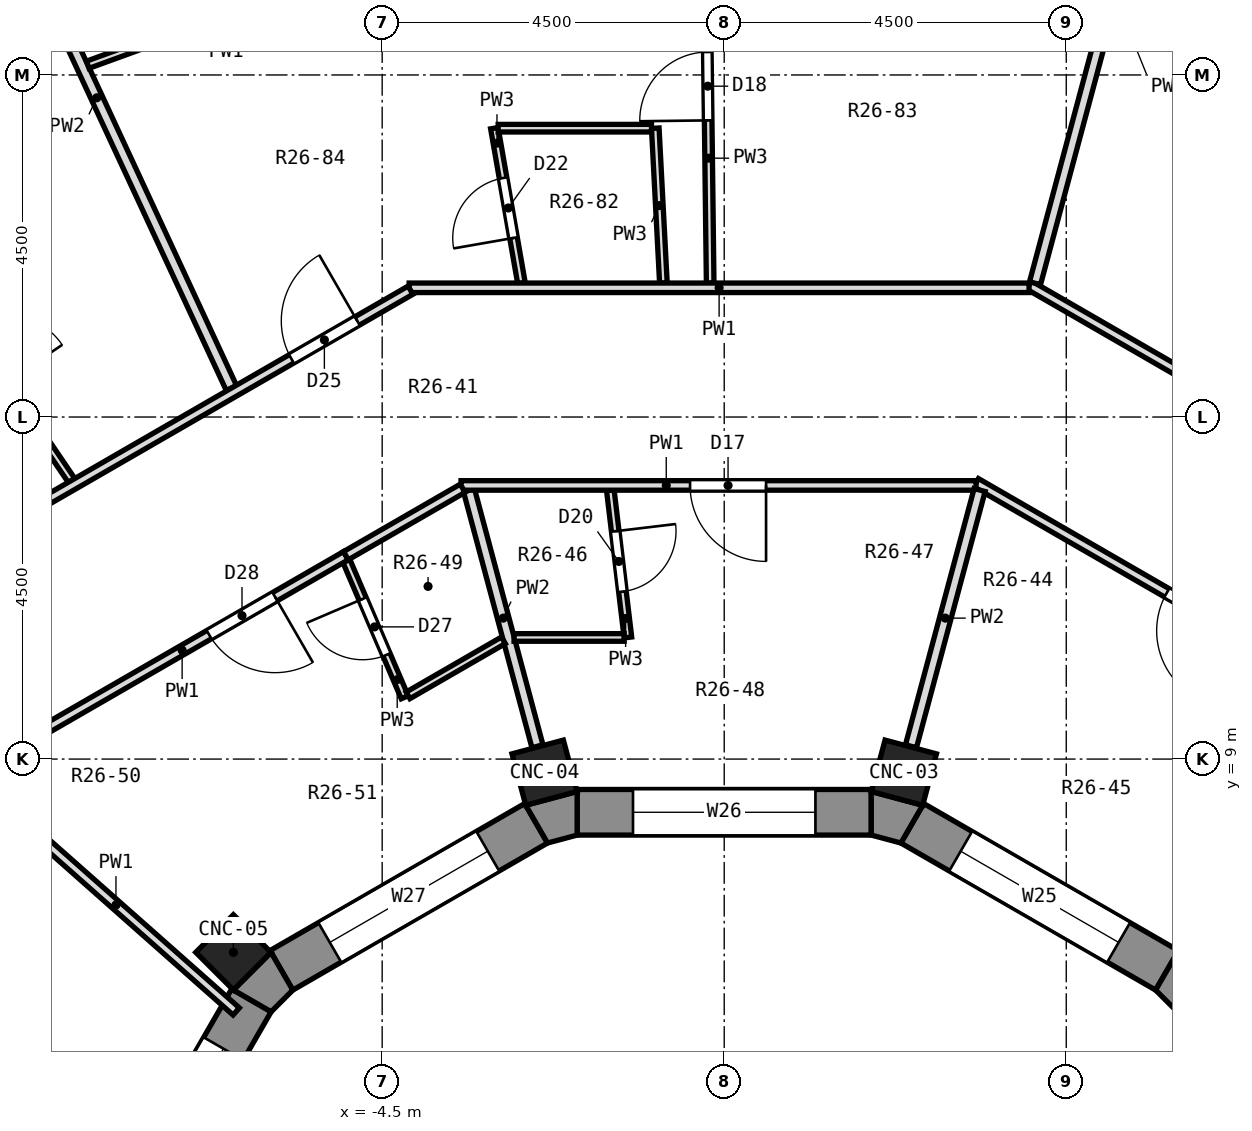
"""IFC4 building model, lengths in metres.
Left out: names, types, materials, properties, quantities, classifications, styles, units other than length and angle.
Written with IfcOpenShell. Run it as: python <this file> out.ifc"""

import sys

from ifc_helpers import new_model, si_unit, direction, frame, frame_2d, origin, origin_2d, place, context, subcontext, project, spatial, polyline, rectangle, outline, extrude, element, fill, save


model = new_model("IFC4")
c1 = context("Model", 3, precision=1e-05, world=origin(), true_north=direction((0.0, 1.0)))
c2 = subcontext(c1, "Body", "Model", "MODEL_VIEW")
j1 = project(units=[si_unit("LENGTHUNIT", "METRE"), si_unit("PLANEANGLEUNIT", "RADIAN")], contexts=[c1])
p1 = place(None, origin())
s1 = spatial("IfcSite", under=j1, at=p1, CompositionType="ELEMENT")
p2 = place(p1, origin())
s2 = spatial("IfcBuilding", under=s1, at=p2, CompositionType="ELEMENT")
p3 = place(p2, frame((0.0, 0.0, 170.7)))
s3 = spatial("IfcBuildingStorey", under=s2, at=p3, CompositionType="ELEMENT", Elevation=170.7)
for number, where, z_axis, x_axis in (
    (1, (2.364, 8.821, 0.0), (0.0, 0.0, 1.0), (0.259, 0.966, 0.0)),
    (2, (-2.364, 8.821, 0.0), (0.0, 0.0, 1.0), (-0.259, 0.966, 0.0)),
    (3, (-6.458, 6.458, 0.0), (0.0, 0.0, 1.0), (-0.707, 0.707, 0.0)),
):
    element("IfcColumn", number, at=place(p3, frame(where, z_axis=z_axis, x_axis=x_axis)), inside=s3, PredefinedType="COLUMN", context=c2, shape_type="SweptSolid", body=[
        extrude(rectangle(XDim=0.7, YDim=0.7, at=origin_2d()), origin(), (0.0, 0.0, 1.0), 3.3),
    ])
p4 = place(p3, frame((5.826, 6.22, 0.0), z_axis=(0.0, 0.0, 1.0), x_axis=(-0.866005929495, 0.500033728941, 0.0)))
e4 = element("IfcWall", 4, at=p4, inside=s3, PredefinedType="SOLIDWALL", context=c2, shape_type="SweptSolid", body=[
    extrude(rectangle(XDim=3.87, YDim=0.6, at=frame_2d((1.935, 0.0))), origin(), (0.0, 0.0, 1.0), 2.85),
])
p5 = place(p4, frame((0.735, 0.0, 0.9)))
e5 = element("IfcOpeningElement", 5, at=p5, cuts=e4, PredefinedType="OPENING", context=c2, shape_type="SweptSolid", body=[
    extrude(rectangle(XDim=2.4, YDim=1.8, at=frame_2d((1.2, 0.9))), frame((0.0, 0.312, 0.0), z_axis=(0.0, -1.0, 0.0), x_axis=(1.0, 0.0, 0.0)), (0.0, 0.0, 1.0), 0.624),
])
p6 = place(p3, frame((1.935, 8.3, 0.0), z_axis=(0.0, 0.0, 1.0), x_axis=(-1.0, 0.0, 0.0)))
e6 = element("IfcWall", 6, at=p6, inside=s3, PredefinedType="SOLIDWALL", context=c2, shape_type="SweptSolid", body=[
    extrude(rectangle(XDim=3.87, YDim=0.6, at=frame_2d((1.935, 0.0))), origin(), (0.0, 0.0, 1.0), 2.85),
])
p7 = place(p6, frame((0.735, 0.0, 0.9)))
e7 = element("IfcOpeningElement", 7, at=p7, cuts=e6, PredefinedType="OPENING", context=c2, shape_type="SweptSolid", body=[
    extrude(rectangle(XDim=2.4, YDim=1.8, at=frame_2d((1.2, 0.9))), frame((0.0, 0.312, 0.0), z_axis=(0.0, -1.0, 0.0), x_axis=(1.0, 0.0, 0.0)), (0.0, 0.0, 1.0), 0.624),
])
p8 = place(p3, frame((-2.474, 8.156, 0.0), z_axis=(0.0, 0.0, 1.0), x_axis=(-0.866005929495, -0.500033728941, 0.0)))
e8 = element("IfcWall", 8, at=p8, inside=s3, PredefinedType="SOLIDWALL", context=c2, shape_type="SweptSolid", body=[
    extrude(rectangle(XDim=3.87, YDim=0.6, at=frame_2d((1.935, 0.0))), origin(), (0.0, 0.0, 1.0), 2.85),
])
p9 = place(p8, frame((0.735, 0.0, 0.9)))
e9 = element("IfcOpeningElement", 9, at=p9, cuts=e8, PredefinedType="OPENING", context=c2, shape_type="SweptSolid", body=[
    extrude(rectangle(XDim=2.4, YDim=1.8, at=frame_2d((1.2, 0.9))), frame((0.0, 0.312, 0.0), z_axis=(0.0, -1.0, 0.0), x_axis=(1.0, 0.0, 0.0)), (0.0, 0.0, 1.0), 0.624),
])
p10 = place(p3, frame((-6.22, 5.826, 0.0), z_axis=(0.0, 0.0, 1.0), x_axis=(-0.500033728941, -0.866005929495, 0.0)))
e10 = element("IfcWall", 10, at=p10, inside=s3, PredefinedType="SOLIDWALL", context=c2, shape_type="SweptSolid", body=[
    extrude(rectangle(XDim=3.87, YDim=0.6, at=frame_2d((1.935, 0.0))), origin(), (0.0, 0.0, 1.0), 2.85),
])
p11 = place(p10, frame((0.735, 0.0, 0.9)))
e11 = element("IfcOpeningElement", 11, at=p11, cuts=e10, PredefinedType="OPENING", context=c2, shape_type="SweptSolid", body=[
    extrude(rectangle(XDim=2.4, YDim=1.8, at=frame_2d((1.2, 0.9))), frame((0.0, 0.312, 0.0), z_axis=(0.0, -1.0, 0.0), x_axis=(1.0, 0.0, 0.0)), (0.0, 0.0, 1.0), 0.624),
])
p12 = place(p3, origin())
e12 = element("IfcWall", 12, at=p12, inside=s3, PredefinedType="SOLIDWALL", context=c2, shape_type="SweptSolid", body=[
    extrude(outline(polyline([(5.962, 6.458), (5.676, 5.961), (5.961, 5.676), (6.458, 5.962), (5.962, 6.458)])), origin(), (0.0, 0.0, 1.0), 2.85),
])
p13 = place(p3, origin())
e13 = element("IfcWall", 13, at=p13, inside=s3, PredefinedType="SOLIDWALL", context=c2, shape_type="SweptSolid", body=[
    extrude(outline(polyline([(1.935, 8.573), (1.935, 8.0), (2.324, 7.896), (2.611, 8.392), (1.935, 8.573)])), origin(), (0.0, 0.0, 1.0), 2.85),
])
p14 = place(p3, origin())
e14 = element("IfcWall", 14, at=p14, inside=s3, PredefinedType="SOLIDWALL", context=c2, shape_type="SweptSolid", body=[
    extrude(outline(polyline([(-1.935, 8.0), (-1.935, 8.573), (-2.611, 8.392), (-2.324, 7.896), (-1.935, 8.0)])), origin(), (0.0, 0.0, 1.0), 2.85),
])
p15 = place(p3, origin())
e15 = element("IfcWall", 15, at=p15, inside=s3, PredefinedType="SOLIDWALL", context=c2, shape_type="SweptSolid", body=[
    extrude(outline(polyline([(-6.458, 5.962), (-5.961, 5.676), (-5.676, 5.961), (-5.962, 6.458), (-6.458, 5.962)])), origin(), (0.0, 0.0, 1.0), 2.85),
])
p16 = place(p3, frame((-0.241, 19.855, 0.0), z_axis=(0.0, 0.0, 1.0), x_axis=(0.012332271409, -0.999923954649, 0.0)))
e16 = element("IfcWall", 16, at=p16, inside=s3, PredefinedType="PARTITIONING", context=c2, shape_type="SweptSolid", body=[
    extrude(rectangle(XDim=4.593, YDim=0.1, at=frame_2d((2.296, 0.0))), origin(), (0.0, 0.0, 1.0), 2.85),
])
p17 = place(p16, frame((1.553, 0.0, 0.0)))
e17 = element("IfcOpeningElement", 17, at=p17, cuts=e16, PredefinedType="OPENING", context=c2, shape_type="SweptSolid", body=[
    extrude(rectangle(XDim=0.9, YDim=2.1, at=frame_2d((0.45, 1.05))), frame((0.0, 0.062, 0.0), z_axis=(0.0, -1.0, 0.0), x_axis=(1.0, 0.0, 0.0)), (0.0, 0.0, 1.0), 0.124),
])
p18 = place(p3, frame((-0.907, 17.3, 0.0), z_axis=(0.0, 0.0, 1.0), x_axis=(0.052288783436, -0.998632005859, 0.0)))
e18 = element("IfcWall", 18, at=p18, inside=s3, PredefinedType="PARTITIONING", context=c2, shape_type="SweptSolid", body=[
    extrude(rectangle(XDim=2.04, YDim=0.1, at=frame_2d((1.02, 0.0))), origin(), (0.0, 0.0, 1.0), 2.85),
])
p19 = place(p3, frame((-1.499, 12.538, 0.0), z_axis=(0.0, 0.0, 1.0), x_axis=(0.118597630283, -0.99294239616, 0.0)))
e19 = element("IfcWall", 19, at=p19, inside=s3, PredefinedType="PARTITIONING", context=c2, shape_type="SweptSolid", body=[
    extrude(rectangle(XDim=1.951, YDim=0.1, at=frame_2d((0.976, 0.0))), origin(), (0.0, 0.0, 1.0), 2.85),
])
p20 = place(p19, frame((0.545, 0.0, 0.0)))
e20 = element("IfcOpeningElement", 20, at=p20, cuts=e19, PredefinedType="OPENING", context=c2, shape_type="SweptSolid", body=[
    extrude(rectangle(XDim=0.8, YDim=2.1, at=frame_2d((0.4, 1.05))), frame((0.0, 0.062, 0.0), z_axis=(0.0, -1.0, 0.0), x_axis=(1.0, 0.0, 0.0)), (0.0, 0.0, 1.0), 0.124),
])
p21 = place(p3, frame((-3.024, 17.3, 0.0), z_axis=(0.0, 0.0, 1.0), x_axis=(0.172122773882, -0.985075505081, 0.0)))
e21 = element("IfcWall", 21, at=p21, inside=s3, PredefinedType="PARTITIONING", context=c2, shape_type="SweptSolid", body=[
    extrude(rectangle(XDim=2.07, YDim=0.1, at=frame_2d((1.035, 0.0))), origin(), (0.0, 0.0, 1.0), 2.85),
])
p22 = place(p21, frame((0.666, 0.0, 0.0)))
e22 = element("IfcOpeningElement", 22, at=p22, cuts=e21, PredefinedType="OPENING", context=c2, shape_type="SweptSolid", body=[
    extrude(rectangle(XDim=0.8, YDim=2.1, at=frame_2d((0.4, 1.05))), frame((0.0, 0.062, 0.0), z_axis=(0.0, -1.0, 0.0), x_axis=(1.0, 0.0, 0.0)), (0.0, 0.0, 1.0), 0.124),
])
p23 = place(p3, frame((-3.359, 12.54, 0.0), z_axis=(0.0, 0.0, 1.0), x_axis=(0.258289617132, -0.966067530601, 0.0)))
e23 = element("IfcWall", 23, at=p23, inside=s3, PredefinedType="PARTITIONING", context=c2, shape_type="SweptSolid", body=[
    extrude(rectangle(XDim=3.49, YDim=0.15, at=frame_2d((1.745, 0.0))), origin(), (0.0, 0.0, 1.0), 2.85),
])
p24 = place(p3, frame((-4.971, 11.607, 0.0), z_axis=(0.0, 0.0, 1.0), x_axis=(0.393707969646, -0.919235570807, 0.0)))
e24 = element("IfcWall", 24, at=p24, inside=s3, PredefinedType="PARTITIONING", context=c2, shape_type="SweptSolid", body=[
    extrude(rectangle(XDim=1.952, YDim=0.1, at=frame_2d((0.976, 0.0))), origin(), (0.0, 0.0, 1.0), 2.85),
])
p25 = place(p24, frame((0.545, 0.0, 0.0)))
e25 = element("IfcOpeningElement", 25, at=p25, cuts=e24, PredefinedType="OPENING", context=c2, shape_type="SweptSolid", body=[
    extrude(rectangle(XDim=0.8, YDim=2.1, at=frame_2d((0.4, 1.05))), frame((0.0, 0.062, 0.0), z_axis=(0.0, -1.0, 0.0), x_axis=(1.0, 0.0, 0.0)), (0.0, 0.0, 1.0), 0.124),
])
p26 = place(p3, frame((-10.026, 21.519, 0.0), z_axis=(0.0, 0.0, 1.0), x_axis=(0.420738120606, -0.907182139302, 0.0)))
e26 = element("IfcWall", 26, at=p26, inside=s3, PredefinedType="PARTITIONING", context=c2, shape_type="SweptSolid", body=[
    extrude(rectangle(XDim=8.42, YDim=0.15, at=frame_2d((4.21, 0.0))), origin(), (0.0, 0.0, 1.0), 2.85),
])
p27 = place(p3, frame((-10.862, 16.02, 0.0), z_axis=(0.0, 0.0, 1.0), x_axis=(0.5612995905, -0.827612693054, 0.0)))
e27 = element("IfcWall", 27, at=p27, inside=s3, PredefinedType="PARTITIONING", context=c2, shape_type="SweptSolid", body=[
    extrude(rectangle(XDim=4.053, YDim=0.1, at=frame_2d((2.026, 0.0))), origin(), (0.0, 0.0, 1.0), 2.85),
])
p28 = place(p27, frame((1.608, 0.0, 0.0)))
e28 = element("IfcOpeningElement", 28, at=p28, cuts=e27, PredefinedType="OPENING", context=c2, shape_type="SweptSolid", body=[
    extrude(rectangle(XDim=0.9, YDim=2.1, at=frame_2d((0.45, 1.05))), frame((0.0, 0.062, 0.0), z_axis=(0.0, -1.0, 0.0), x_axis=(1.0, 0.0, 0.0)), (0.0, 0.0, 1.0), 0.124),
])
p29 = place(p3, frame((-9.585, 8.48, 0.0), z_axis=(0.0, 0.0, 1.0), x_axis=(0.748972302021, -0.662601306069, 0.0)))
e29 = element("IfcWall", 29, at=p29, inside=s3, PredefinedType="PARTITIONING", context=c2, shape_type="SweptSolid", body=[
    extrude(rectangle(XDim=4.226, YDim=0.125, at=frame_2d((2.113, 0.0))), origin(), (0.0, 0.0, 1.0), 2.85),
])
p30 = place(p3, frame((3.313, 12.636, 0.0), z_axis=(0.0, 0.0, 1.0), x_axis=(0.866048512801, -0.499959971872, 0.0)))
e30 = element("IfcWall", 30, at=p30, inside=s3, PredefinedType="PARTITIONING", context=c2, shape_type="SweptSolid", body=[
    extrude(rectangle(XDim=6.762, YDim=0.125, at=frame_2d((3.381, 0.0))), origin(), (0.0, 0.0, 1.0), 2.85),
])
p31 = place(p30, frame((2.898, 0.0, 0.0)))
e31 = element("IfcOpeningElement", 31, at=p31, cuts=e30, PredefinedType="OPENING", context=c2, shape_type="SweptSolid", body=[
    extrude(rectangle(XDim=1.0, YDim=2.1, at=frame_2d((0.5, 1.05))), frame((0.0, 0.074, 0.0), z_axis=(0.0, -1.0, 0.0), x_axis=(1.0, 0.0, 0.0)), (0.0, 0.0, 1.0), 0.149),
])
p32 = place(p3, frame((4.01, 15.236, 0.0), z_axis=(0.0, 0.0, 1.0), x_axis=(0.865999621737, -0.500044653157, 0.0)))
e32 = element("IfcWall", 32, at=p32, inside=s3, PredefinedType="PARTITIONING", context=c2, shape_type="SweptSolid", body=[
    extrude(rectangle(XDim=8.155, YDim=0.125, at=frame_2d((4.078, 0.0))), origin(), (0.0, 0.0, 1.0), 2.85),
])
p33 = place(p32, frame((2.656, 0.0, 0.0)))
e33 = element("IfcOpeningElement", 33, at=p33, cuts=e32, PredefinedType="OPENING", context=c2, shape_type="SweptSolid", body=[
    extrude(rectangle(XDim=1.0, YDim=2.1, at=frame_2d((0.5, 1.05))), frame((0.0, 0.074, 0.0), z_axis=(0.0, -1.0, 0.0), x_axis=(1.0, 0.0, 0.0)), (0.0, 0.0, 1.0), 0.149),
])
p34 = place(p3, frame((-2.765, 10.6, 0.0), z_axis=(0.0, 0.0, 1.0), x_axis=(1.0, 0.0, 0.0)))
e34 = element("IfcWall", 34, at=p34, inside=s3, PredefinedType="PARTITIONING", context=c2, shape_type="SweptSolid", body=[
    extrude(rectangle(XDim=1.448, YDim=0.1, at=frame_2d((0.724, 0.0))), origin(), (0.0, 0.0, 1.0), 2.85),
])
p35 = place(p3, frame((-3.463, 12.6, 0.0), z_axis=(0.0, 0.0, 1.0), x_axis=(1.0, 0.0, 0.0)))
e35 = element("IfcWall", 35, at=p35, inside=s3, PredefinedType="PARTITIONING", context=c2, shape_type="SweptSolid", body=[
    extrude(rectangle(XDim=6.776, YDim=0.125, at=frame_2d((3.388, 0.0))), origin(), (0.0, 0.0, 1.0), 2.85),
])
p36 = place(p35, frame((3.013, 0.0, 0.0)))
e36 = element("IfcOpeningElement", 36, at=p36, cuts=e35, PredefinedType="OPENING", context=c2, shape_type="SweptSolid", body=[
    extrude(rectangle(XDim=1.0, YDim=2.1, at=frame_2d((0.5, 1.05))), frame((0.0, 0.074, 0.0), z_axis=(0.0, -1.0, 0.0), x_axis=(1.0, 0.0, 0.0)), (0.0, 0.0, 1.0), 0.149),
])
p37 = place(p3, frame((-4.145, 15.2, 0.0), z_axis=(0.0, 0.0, 1.0), x_axis=(1.0, 0.0, 0.0)))
e37 = element("IfcWall", 37, at=p37, inside=s3, PredefinedType="PARTITIONING", context=c2, shape_type="SweptSolid", body=[
    extrude(rectangle(XDim=8.156, YDim=0.125, at=frame_2d((4.078, 0.0))), origin(), (0.0, 0.0, 1.0), 2.85),
])
p38 = place(p3, frame((-2.974, 17.3, 0.0), z_axis=(0.0, 0.0, 1.0), x_axis=(1.0, 0.0, 0.0)))
e38 = element("IfcWall", 38, at=p38, inside=s3, PredefinedType="PARTITIONING", context=c2, shape_type="SweptSolid", body=[
    extrude(rectangle(XDim=2.017, YDim=0.1, at=frame_2d((1.009, 0.0))), origin(), (0.0, 0.0, 1.0), 2.85),
])
p39 = place(p3, frame((-8.374, 18.135, 0.0), z_axis=(0.0, 0.0, 1.0), x_axis=(0.939750886848, 0.341860016189, 0.0)))
e39 = element("IfcWall", 39, at=p39, inside=s3, PredefinedType="PARTITIONING", context=c2, shape_type="SweptSolid", body=[
    extrude(rectangle(XDim=2.179, YDim=0.1, at=frame_2d((1.089, 0.0))), origin(), (0.0, 0.0, 1.0), 2.85),
])
p40 = place(p3, frame((-4.16, 9.838, 0.0), z_axis=(0.0, 0.0, 1.0), x_axis=(0.865952650684, 0.500125990899, 0.0)))
e40 = element("IfcWall", 40, at=p40, inside=s3, PredefinedType="PARTITIONING", context=c2, shape_type="SweptSolid", body=[
    extrude(rectangle(XDim=1.449, YDim=0.1, at=frame_2d((0.725, 0.0))), origin(), (0.0, 0.0, 1.0), 2.85),
])
p41 = place(p3, frame((-9.287, 9.188, 0.0), z_axis=(0.0, 0.0, 1.0), x_axis=(0.866054867757, 0.499948963429, 0.0)))
e41 = element("IfcWall", 41, at=p41, inside=s3, PredefinedType="PARTITIONING", context=c2, shape_type="SweptSolid", body=[
    extrude(rectangle(XDim=4.976, YDim=0.125, at=frame_2d((2.488, 0.0))), origin(), (0.0, 0.0, 1.0), 2.85),
])
p42 = place(p41, frame((2.898, 0.0, 0.0)))
e42 = element("IfcOpeningElement", 42, at=p42, cuts=e41, PredefinedType="OPENING", context=c2, shape_type="SweptSolid", body=[
    extrude(rectangle(XDim=1.0, YDim=2.1, at=frame_2d((0.5, 1.05))), frame((0.0, 0.074, 0.0), z_axis=(0.0, -1.0, 0.0), x_axis=(1.0, 0.0, 0.0)), (0.0, 0.0, 1.0), 0.149),
])
p43 = place(p3, frame((-4.977, 11.676, 0.0), z_axis=(0.0, 0.0, 1.0), x_axis=(0.866066400931, 0.499928984136, 0.0)))
e43 = element("IfcWall", 43, at=p43, inside=s3, PredefinedType="PARTITIONING", context=c2, shape_type="SweptSolid", body=[
    extrude(rectangle(XDim=1.774, YDim=0.125, at=frame_2d((0.887, 0.0))), origin(), (0.0, 0.0, 1.0), 2.85),
])
p44 = place(p3, frame((-11.189, 11.091, 0.0), z_axis=(0.0, 0.0, 1.0), x_axis=(0.865999621737, 0.500044653157, 0.0)))
e44 = element("IfcWall", 44, at=p44, inside=s3, PredefinedType="PARTITIONING", context=c2, shape_type="SweptSolid", body=[
    extrude(rectangle(XDim=8.155, YDim=0.125, at=frame_2d((4.078, 0.0))), origin(), (0.0, 0.0, 1.0), 2.85),
])
p45 = place(p44, frame((6.346, 0.0, 0.0)))
e45 = element("IfcOpeningElement", 45, at=p45, cuts=e44, PredefinedType="OPENING", context=c2, shape_type="SweptSolid", body=[
    extrude(rectangle(XDim=1.0, YDim=2.1, at=frame_2d((0.5, 1.05))), frame((0.0, 0.074, 0.0), z_axis=(0.0, -1.0, 0.0), x_axis=(1.0, 0.0, 0.0)), (0.0, 0.0, 1.0), 0.149),
])
p46 = place(p44, frame((1.109, 0.0, 0.0)))
e46 = element("IfcOpeningElement", 46, at=p46, cuts=e44, PredefinedType="OPENING", context=c2, shape_type="SweptSolid", body=[
    extrude(rectangle(XDim=0.9, YDim=2.1, at=frame_2d((0.45, 1.05))), frame((0.0, 0.074, 0.0), z_axis=(0.0, -1.0, 0.0), x_axis=(1.0, 0.0, 0.0)), (0.0, 0.0, 1.0), 0.149),
])
p47 = place(p3, frame((2.457, 9.169, 0.0), z_axis=(0.0, 0.0, 1.0), x_axis=(0.258716268746, 0.96595335927, 0.0)))
e47 = element("IfcWall", 47, at=p47, inside=s3, PredefinedType="PARTITIONING", context=c2, shape_type="SweptSolid", body=[
    extrude(rectangle(XDim=3.49, YDim=0.15, at=frame_2d((1.745, 0.0))), origin(), (0.0, 0.0, 1.0), 2.85),
])
p48 = place(p3, frame((4.089, 15.26, 0.0), z_axis=(0.0, 0.0, 1.0), x_axis=(0.258762721017, 0.965940916522, 0.0)))
e48 = element("IfcWall", 48, at=p48, inside=s3, PredefinedType="PARTITIONING", context=c2, shape_type="SweptSolid", body=[
    extrude(rectangle(XDim=7.941, YDim=0.15, at=frame_2d((3.971, 0.0))), origin(), (0.0, 0.0, 1.0), 2.85),
])
p49 = place(p5, origin())
e49 = element("IfcWindow", 49, at=p49, inside=s3, PartitioningType="SINGLE_PANEL", PredefinedType="WINDOW", context=c2, shape_type="SweptSolid", body=[
    extrude(rectangle(XDim=2.4, YDim=1.8, at=frame_2d((1.2, 0.9))), frame((0.0, -0.12, 0.0), z_axis=(0.0, -1.0, 0.0), x_axis=(1.0, 0.0, 0.0)), (0.0, 0.0, 1.0), 0.06),
])
fill(e5, e49)
p50 = place(p7, origin())
e50 = element("IfcWindow", 50, at=p50, inside=s3, PartitioningType="SINGLE_PANEL", PredefinedType="WINDOW", context=c2, shape_type="SweptSolid", body=[
    extrude(rectangle(XDim=2.4, YDim=1.8, at=frame_2d((1.2, 0.9))), frame((0.0, -0.12, 0.0), z_axis=(0.0, -1.0, 0.0), x_axis=(1.0, 0.0, 0.0)), (0.0, 0.0, 1.0), 0.06),
])
fill(e7, e50)
p51 = place(p9, origin())
e51 = element("IfcWindow", 51, at=p51, inside=s3, PartitioningType="SINGLE_PANEL", PredefinedType="WINDOW", context=c2, shape_type="SweptSolid", body=[
    extrude(rectangle(XDim=2.4, YDim=1.8, at=frame_2d((1.2, 0.9))), frame((0.0, -0.12, 0.0), z_axis=(0.0, -1.0, 0.0), x_axis=(1.0, 0.0, 0.0)), (0.0, 0.0, 1.0), 0.06),
])
fill(e9, e51)
p52 = place(p11, origin())
e52 = element("IfcWindow", 52, at=p52, inside=s3, PartitioningType="SINGLE_PANEL", PredefinedType="WINDOW", context=c2, shape_type="SweptSolid", body=[
    extrude(rectangle(XDim=2.4, YDim=1.8, at=frame_2d((1.2, 0.9))), frame((0.0, -0.12, 0.0), z_axis=(0.0, -1.0, 0.0), x_axis=(1.0, 0.0, 0.0)), (0.0, 0.0, 1.0), 0.06),
])
fill(e11, e52)
p53 = place(p31, frame((1.0, 0.0, 0.0), z_axis=(0.0, 0.0, 1.0), x_axis=(-1.0, 0.0, 0.0)))
e53 = element("IfcDoor", 53, at=p53, inside=s3, OperationType="SINGLE_SWING_LEFT", PredefinedType="DOOR", context=c2, shape_type="SweptSolid", body=[
    extrude(rectangle(XDim=1.0, YDim=2.1, at=frame_2d((0.5, 1.05))), frame((0.0, 0.025, 0.0), z_axis=(0.0, -1.0, 0.0), x_axis=(1.0, 0.0, 0.0)), (0.0, 0.0, 1.0), 0.05),
])
fill(e31, e53)
p54 = place(p36, frame((1.0, 0.0, 0.0), z_axis=(0.0, 0.0, 1.0), x_axis=(-1.0, 0.0, 0.0)))
e54 = element("IfcDoor", 54, at=p54, inside=s3, OperationType="SINGLE_SWING_LEFT", PredefinedType="DOOR", context=c2, shape_type="SweptSolid", body=[
    extrude(rectangle(XDim=1.0, YDim=2.1, at=frame_2d((0.5, 1.05))), frame((0.0, 0.025, 0.0), z_axis=(0.0, -1.0, 0.0), x_axis=(1.0, 0.0, 0.0)), (0.0, 0.0, 1.0), 0.05),
])
fill(e36, e54)
p55 = place(p17, frame((0.9, 0.0, 0.0), z_axis=(0.0, 0.0, 1.0), x_axis=(-1.0, 0.0, 0.0)))
e55 = element("IfcDoor", 55, at=p55, inside=s3, OperationType="SINGLE_SWING_LEFT", PredefinedType="DOOR", context=c2, shape_type="SweptSolid", body=[
    extrude(rectangle(XDim=0.9, YDim=2.1, at=frame_2d((0.45, 1.05))), frame((0.0, 0.025, 0.0), z_axis=(0.0, -1.0, 0.0), x_axis=(1.0, 0.0, 0.0)), (0.0, 0.0, 1.0), 0.05),
])
fill(e17, e55)
p56 = place(p20, origin())
e56 = element("IfcDoor", 56, at=p56, inside=s3, OperationType="SINGLE_SWING_LEFT", PredefinedType="DOOR", context=c2, shape_type="SweptSolid", body=[
    extrude(rectangle(XDim=0.8, YDim=2.1, at=frame_2d((0.4, 1.05))), frame((0.0, 0.025, 0.0), z_axis=(0.0, -1.0, 0.0), x_axis=(1.0, 0.0, 0.0)), (0.0, 0.0, 1.0), 0.05),
])
fill(e20, e56)
p57 = place(p22, frame((0.8, 0.0, 0.0), z_axis=(0.0, 0.0, 1.0), x_axis=(-1.0, 0.0, 0.0)))
e57 = element("IfcDoor", 57, at=p57, inside=s3, OperationType="SINGLE_SWING_LEFT", PredefinedType="DOOR", context=c2, shape_type="SweptSolid", body=[
    extrude(rectangle(XDim=0.8, YDim=2.1, at=frame_2d((0.4, 1.05))), frame((0.0, 0.025, 0.0), z_axis=(0.0, -1.0, 0.0), x_axis=(1.0, 0.0, 0.0)), (0.0, 0.0, 1.0), 0.05),
])
fill(e22, e57)
p58 = place(p45, origin())
e58 = element("IfcDoor", 58, at=p58, inside=s3, OperationType="SINGLE_SWING_RIGHT", PredefinedType="DOOR", context=c2, shape_type="SweptSolid", body=[
    extrude(rectangle(XDim=1.0, YDim=2.1, at=frame_2d((0.5, 1.05))), frame((0.0, 0.025, 0.0), z_axis=(0.0, -1.0, 0.0), x_axis=(1.0, 0.0, 0.0)), (0.0, 0.0, 1.0), 0.05),
])
fill(e45, e58)
p59 = place(p25, frame((0.8, 0.0, 0.0), z_axis=(0.0, 0.0, 1.0), x_axis=(-1.0, 0.0, 0.0)))
e59 = element("IfcDoor", 59, at=p59, inside=s3, OperationType="SINGLE_SWING_RIGHT", PredefinedType="DOOR", context=c2, shape_type="SweptSolid", body=[
    extrude(rectangle(XDim=0.8, YDim=2.1, at=frame_2d((0.4, 1.05))), frame((0.0, 0.025, 0.0), z_axis=(0.0, -1.0, 0.0), x_axis=(1.0, 0.0, 0.0)), (0.0, 0.0, 1.0), 0.05),
])
fill(e25, e59)
p60 = place(p42, frame((1.0, 0.0, 0.0), z_axis=(0.0, 0.0, 1.0), x_axis=(-1.0, 0.0, 0.0)))
e60 = element("IfcDoor", 60, at=p60, inside=s3, OperationType="SINGLE_SWING_LEFT", PredefinedType="DOOR", context=c2, shape_type="SweptSolid", body=[
    extrude(rectangle(XDim=1.0, YDim=2.1, at=frame_2d((0.5, 1.05))), frame((0.0, 0.025, 0.0), z_axis=(0.0, -1.0, 0.0), x_axis=(1.0, 0.0, 0.0)), (0.0, 0.0, 1.0), 0.05),
])
fill(e42, e60)
save(model, sys.argv[1])
